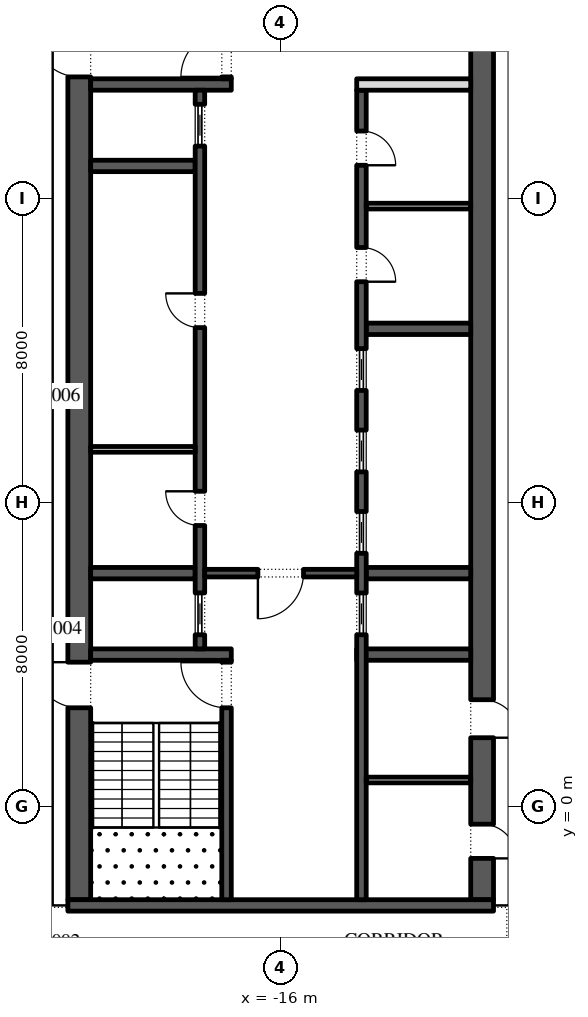
"""IFC4 building model, lengths in metres.
Left out: names, types, materials, properties, quantities, classifications, styles, units other than length and angle.
Written with IfcOpenShell. Run it as: python <this file> out.ifc"""

import sys

from ifc_helpers import new_model, si_unit, direction, frame, frame_2d, origin, place, context, subcontext, project, spatial, rectangle, extrude, element, fill, save


model = new_model("IFC4")
c1 = context("Model", 3, precision=1e-05, world=origin(), true_north=direction((0.0, 1.0)))
c2 = subcontext(c1, "Body", "Model", "MODEL_VIEW")
j1 = project(units=[si_unit("LENGTHUNIT", "METRE"), si_unit("PLANEANGLEUNIT", "RADIAN")], contexts=[c1])
p1 = place(None, origin())
s1 = spatial("IfcSite", under=j1, at=p1, CompositionType="ELEMENT")
p2 = place(p1, origin())
s2 = spatial("IfcBuilding", under=s1, at=p2, CompositionType="ELEMENT")
p3 = place(p2, frame((0.0, 0.0, 268.2)))
s3 = spatial("IfcBuildingStorey", under=s2, at=p3, CompositionType="ELEMENT", Elevation=268.2)
p4 = place(p3, frame((-21.359, 48.678, 0.0), z_axis=(0.0, 0.0, 1.0), x_axis=(-0.224949198343, -0.974370493275, 0.0)))
e1 = element("IfcWall", 1, at=p4, inside=s3, PredefinedType="STANDARD", context=c2, shape_type="SweptSolid", body=[
    extrude(rectangle(XDim=49.5, YDim=0.3, at=frame_2d((24.75, 0.0))), origin(), (0.0, 0.0, 1.0), 4.0),
])
p5 = place(p4, frame((1.157, 0.0, 0.45)))
e2 = element("IfcOpeningElement", 2, at=p5, cuts=e1, PredefinedType="OPENING", context=c2, shape_type="SweptSolid", body=[
    extrude(rectangle(XDim=4.5, YDim=3.05, at=frame_2d((2.25, 1.525))), frame((0.0, 0.16, 0.0), z_axis=(0.0, -1.0, 0.0), x_axis=(1.0, 0.0, 0.0)), (0.0, 0.0, 1.0), 0.32),
])
p6 = place(p4, frame((9.171, 0.0, 0.0)))
e3 = element("IfcOpeningElement", 3, at=p6, cuts=e1, PredefinedType="OPENING", context=c2, shape_type="SweptSolid", body=[
    extrude(rectangle(XDim=2.4, YDim=3.5, at=frame_2d((1.2, 1.75))), frame((0.0, 0.16, 0.0), z_axis=(0.0, -1.0, 0.0), x_axis=(1.0, 0.0, 0.0)), (0.0, 0.0, 1.0), 0.32),
])
p7 = place(p4, frame((15.236, 0.0, 0.45)))
e4 = element("IfcOpeningElement", 4, at=p7, cuts=e1, PredefinedType="OPENING", context=c2, shape_type="SweptSolid", body=[
    extrude(rectangle(XDim=4.5, YDim=3.05, at=frame_2d((2.25, 1.525))), frame((0.0, 0.16, 0.0), z_axis=(0.0, -1.0, 0.0), x_axis=(1.0, 0.0, 0.0)), (0.0, 0.0, 1.0), 0.32),
])
p8 = place(p4, frame((22.35, 0.0, 0.45)))
e5 = element("IfcOpeningElement", 5, at=p8, cuts=e1, PredefinedType="OPENING", context=c2, shape_type="SweptSolid", body=[
    extrude(rectangle(XDim=4.5, YDim=3.05, at=frame_2d((2.25, 1.525))), frame((0.0, 0.16, 0.0), z_axis=(0.0, -1.0, 0.0), x_axis=(1.0, 0.0, 0.0)), (0.0, 0.0, 1.0), 0.32),
])
p9 = place(p4, frame((29.464, 0.0, 0.45)))
e6 = element("IfcOpeningElement", 6, at=p9, cuts=e1, PredefinedType="OPENING", context=c2, shape_type="SweptSolid", body=[
    extrude(rectangle(XDim=4.5, YDim=3.05, at=frame_2d((2.25, 1.525))), frame((0.0, 0.16, 0.0), z_axis=(0.0, -1.0, 0.0), x_axis=(1.0, 0.0, 0.0)), (0.0, 0.0, 1.0), 0.32),
])
p10 = place(p4, frame((37.628, 0.0, 0.0)))
e7 = element("IfcOpeningElement", 7, at=p10, cuts=e1, PredefinedType="OPENING", context=c2, shape_type="SweptSolid", body=[
    extrude(rectangle(XDim=2.4, YDim=3.325, at=frame_2d((1.2, 1.663))), frame((0.0, 0.16, 0.0), z_axis=(0.0, -1.0, 0.0), x_axis=(1.0, 0.0, 0.0)), (0.0, 0.0, 1.0), 0.32),
])
p11 = place(p4, frame((43.693, 0.0, 0.45)))
e8 = element("IfcOpeningElement", 8, at=p11, cuts=e1, PredefinedType="OPENING", context=c2, shape_type="SweptSolid", body=[
    extrude(rectangle(XDim=4.5, YDim=2.825, at=frame_2d((2.25, 1.413))), frame((0.0, 0.16, 0.0), z_axis=(0.0, -1.0, 0.0), x_axis=(1.0, 0.0, 0.0)), (0.0, 0.0, 1.0), 0.32),
])
p12 = place(p3, frame((-21.3, -2.45, 0.0), z_axis=(0.0, 0.0, 1.0), x_axis=(0.0, 1.0, 0.0)))
e9 = element("IfcWall", 9, at=p12, inside=s3, PredefinedType="SHEAR", context=c2, shape_type="SweptSolid", body=[
    extrude(rectangle(XDim=27.9, YDim=0.6, at=frame_2d((13.95, 0.0))), origin(), (0.0, 0.0, 1.0), 4.0),
])
p13 = place(p12, frame((5.05, 0.0, 0.0)))
e10 = element("IfcOpeningElement", 10, at=p13, cuts=e9, PredefinedType="OPENING", context=c2, shape_type="SweptSolid", body=[
    extrude(rectangle(XDim=1.2, YDim=2.1, at=frame_2d((0.6, 1.05))), frame((0.0, 0.31, 0.0), z_axis=(0.0, -1.0, 0.0), x_axis=(1.0, 0.0, 0.0)), (0.0, 0.0, 1.0), 0.62),
])
p14 = place(p12, frame((21.65, 0.0, 0.0)))
e11 = element("IfcOpeningElement", 11, at=p14, cuts=e9, PredefinedType="OPENING", context=c2, shape_type="SweptSolid", body=[
    extrude(rectangle(XDim=1.2, YDim=2.1, at=frame_2d((0.6, 1.05))), frame((0.0, 0.31, 0.0), z_axis=(0.0, -1.0, 0.0), x_axis=(1.0, 0.0, 0.0)), (0.0, 0.0, 1.0), 0.62),
])
p15 = place(p3, frame((-10.7, -2.45, 0.0), z_axis=(0.0, 0.0, 1.0), x_axis=(0.0, 1.0, 0.0)))
e12 = element("IfcWall", 12, at=p15, inside=s3, PredefinedType="SHEAR", context=c2, shape_type="SweptSolid", body=[
    extrude(rectangle(XDim=27.9, YDim=0.6, at=frame_2d((13.95, 0.0))), origin(), (0.0, 0.0, 1.0), 4.0),
])
p16 = place(p15, frame((23.65, 0.0, 0.0)))
e13 = element("IfcOpeningElement", 13, at=p16, cuts=e12, PredefinedType="OPENING", context=c2, shape_type="SweptSolid", body=[
    extrude(rectangle(XDim=2.4, YDim=2.1, at=frame_2d((1.2, 1.05))), frame((0.0, 0.31, 0.0), z_axis=(0.0, -1.0, 0.0), x_axis=(1.0, 0.0, 0.0)), (0.0, 0.0, 1.0), 0.62),
])
p17 = place(p15, frame((1.087, 0.0, 0.0)))
e14 = element("IfcOpeningElement", 14, at=p17, cuts=e12, PredefinedType="OPENING", context=c2, shape_type="SweptSolid", body=[
    extrude(rectangle(XDim=0.9, YDim=2.1, at=frame_2d((0.45, 1.05))), frame((0.0, 0.31, 0.0), z_axis=(0.0, -1.0, 0.0), x_axis=(1.0, 0.0, 0.0)), (0.0, 0.0, 1.0), 0.62),
])
p18 = place(p15, frame((4.262, 0.0, 0.0)))
e15 = element("IfcOpeningElement", 15, at=p18, cuts=e12, PredefinedType="OPENING", context=c2, shape_type="SweptSolid", body=[
    extrude(rectangle(XDim=1.0, YDim=2.1, at=frame_2d((0.5, 1.05))), frame((0.0, 0.31, 0.0), z_axis=(0.0, -1.0, 0.0), x_axis=(1.0, 0.0, 0.0)), (0.0, 0.0, 1.0), 0.62),
])
p19 = place(p3, frame((-21.6, -2.6, 0.0), z_axis=(0.0, 0.0, 1.0), x_axis=(1.0, 0.0, 0.0)))
e16 = element("IfcWall", 16, at=p19, inside=s3, PredefinedType="SHEAR", context=c2, shape_type="SweptSolid", body=[
    extrude(rectangle(XDim=11.2, YDim=0.3, at=frame_2d((5.6, 0.0))), origin(), (0.0, 0.0, 1.0), 4.0),
])
p20 = place(p3, frame((-21.0, 4.0, 0.0), z_axis=(0.0, 0.0, 1.0), x_axis=(1.0, 0.0, 0.0)))
e17 = element("IfcWall", 17, at=p20, inside=s3, PredefinedType="SHEAR", context=c2, shape_type="SweptSolid", body=[
    extrude(rectangle(XDim=3.7, YDim=0.3, at=frame_2d((1.85, 0.0))), origin(), (0.0, 0.0, 1.0), 4.0),
])
p21 = place(p3, frame((-17.425, -2.45, 0.0), z_axis=(0.0, 0.0, 1.0), x_axis=(0.0, 1.0, 0.0)))
e18 = element("IfcWall", 18, at=p21, inside=s3, PredefinedType="SHEAR", context=c2, shape_type="SweptSolid", body=[
    extrude(rectangle(XDim=6.3, YDim=0.25, at=frame_2d((3.15, 0.0))), origin(), (0.0, 0.0, 1.0), 4.0),
])
p22 = place(p21, frame((5.05, 0.0, 0.0)))
e19 = element("IfcOpeningElement", 19, at=p22, cuts=e18, PredefinedType="OPENING", context=c2, shape_type="SweptSolid", body=[
    extrude(rectangle(XDim=1.2, YDim=2.1, at=frame_2d((0.6, 1.05))), frame((0.0, 0.135, 0.0), z_axis=(0.0, -1.0, 0.0), x_axis=(1.0, 0.0, 0.0)), (0.0, 0.0, 1.0), 0.27),
])
p23 = place(p3, frame((-21.0, 19.0, 0.0), z_axis=(0.0, 0.0, 1.0), x_axis=(1.0, 0.0, 0.0)))
e20 = element("IfcWall", 20, at=p23, inside=s3, PredefinedType="SHEAR", context=c2, shape_type="SweptSolid", body=[
    extrude(rectangle(XDim=3.7, YDim=0.3, at=frame_2d((1.85, 0.0))), origin(), (0.0, 0.0, 1.0), 4.0),
])
p24 = place(p3, frame((-17.425, 19.15, 0.0), z_axis=(0.0, 0.0, 1.0), x_axis=(0.0, 1.0, 0.0)))
e21 = element("IfcWall", 21, at=p24, inside=s3, PredefinedType="SHEAR", context=c2, shape_type="SweptSolid", body=[
    extrude(rectangle(XDim=6.3, YDim=0.25, at=frame_2d((3.15, 0.0))), origin(), (0.0, 0.0, 1.0), 4.0),
])
p25 = place(p24, frame((0.05, 0.0, 0.0)))
e22 = element("IfcOpeningElement", 22, at=p25, cuts=e21, PredefinedType="OPENING", context=c2, shape_type="SweptSolid", body=[
    extrude(rectangle(XDim=1.2, YDim=2.1, at=frame_2d((0.6, 1.05))), frame((0.0, 0.135, 0.0), z_axis=(0.0, -1.0, 0.0), x_axis=(1.0, 0.0, 0.0)), (0.0, 0.0, 1.0), 0.27),
])
for number, where, z_axis, x_axis in (
    (23, (-21.0, 6.143, 0.0), (0.0, 0.0, 1.0), (1.0, 0.0, 0.0)),
    (24, (-21.0, 16.857, 0.0), (0.0, 0.0, 1.0), (1.0, 0.0, 0.0)),
):
    element("IfcWall", number, at=place(p3, frame(where, z_axis=z_axis, x_axis=x_axis)), inside=s3, PredefinedType="SHEAR", context=c2, shape_type="SweptSolid", body=[
        extrude(rectangle(XDim=2.75, YDim=0.3, at=frame_2d((1.375, 0.0))), origin(), (0.0, 0.0, 1.0), 4.0),
    ])
p26 = place(p3, frame((-18.125, 4.15, 0.0), z_axis=(0.0, 0.0, 1.0), x_axis=(0.0, 1.0, 0.0)))
e25 = element("IfcWall", 25, at=p26, inside=s3, PredefinedType="SHEAR", context=c2, shape_type="SweptSolid", body=[
    extrude(rectangle(XDim=14.7, YDim=0.25, at=frame_2d((7.35, 0.0))), origin(), (0.0, 0.0, 1.0), 4.0),
])
p27 = place(p26, frame((3.246, 0.0, 0.0)))
e26 = element("IfcOpeningElement", 26, at=p27, cuts=e25, PredefinedType="OPENING", context=c2, shape_type="SweptSolid", body=[
    extrude(rectangle(XDim=0.9, YDim=2.1, at=frame_2d((0.45, 1.05))), frame((0.0, 0.135, 0.0), z_axis=(0.0, -1.0, 0.0), x_axis=(1.0, 0.0, 0.0)), (0.0, 0.0, 1.0), 0.27),
])
p28 = place(p26, frame((8.454, 0.0, 0.0)))
e27 = element("IfcOpeningElement", 27, at=p28, cuts=e25, PredefinedType="OPENING", context=c2, shape_type="SweptSolid", body=[
    extrude(rectangle(XDim=0.9, YDim=2.1, at=frame_2d((0.45, 1.05))), frame((0.0, 0.135, 0.0), z_axis=(0.0, -1.0, 0.0), x_axis=(1.0, 0.0, 0.0)), (0.0, 0.0, 1.0), 0.27),
])
p29 = place(p26, frame((0.371, 0.0, 0.0)))
e28 = element("IfcOpeningElement", 28, at=p29, cuts=e25, PredefinedType="OPENING", context=c2, shape_type="SweptSolid", body=[
    extrude(rectangle(XDim=1.1, YDim=2.1, at=frame_2d((0.55, 1.05))), frame((0.0, 0.135, 0.0), z_axis=(0.0, -1.0, 0.0), x_axis=(1.0, 0.0, 0.0)), (0.0, 0.0, 1.0), 0.27),
])
p30 = place(p26, frame((13.229, 0.0, 0.0)))
e29 = element("IfcOpeningElement", 29, at=p30, cuts=e25, PredefinedType="OPENING", context=c2, shape_type="SweptSolid", body=[
    extrude(rectangle(XDim=1.1, YDim=2.1, at=frame_2d((0.55, 1.05))), frame((0.0, 0.135, 0.0), z_axis=(0.0, -1.0, 0.0), x_axis=(1.0, 0.0, 0.0)), (0.0, 0.0, 1.0), 0.27),
])
p31 = place(p3, frame((-21.0, 9.4, 0.0), z_axis=(0.0, 0.0, 1.0), x_axis=(1.0, 0.0, 0.0)))
e30 = element("IfcWall", 30, at=p31, inside=s3, PredefinedType="PARTITIONING", context=c2, shape_type="SweptSolid", body=[
    extrude(rectangle(XDim=2.75, YDim=0.15, at=frame_2d((1.375, 0.0))), origin(), (0.0, 0.0, 1.0), 4.0),
])
p32 = place(p3, frame((-14.0, 4.0, 0.0), z_axis=(0.0, 0.0, 1.0), x_axis=(1.0, 0.0, 0.0)))
e31 = element("IfcWall", 31, at=p32, inside=s3, PredefinedType="SHEAR", context=c2, shape_type="SweptSolid", body=[
    extrude(rectangle(XDim=3.0, YDim=0.3, at=frame_2d((1.5, 0.0))), origin(), (0.0, 0.0, 1.0), 4.0),
])
for number, where, z_axis, x_axis in (
    (32, (-13.75, 6.143, 0.0), (0.0, 0.0, 1.0), (1.0, 0.0, 0.0)),
    (33, (-13.75, 12.571, 0.0), (0.0, 0.0, 1.0), (1.0, 0.0, 0.0)),
):
    element("IfcWall", number, at=place(p3, frame(where, z_axis=z_axis, x_axis=x_axis)), inside=s3, PredefinedType="SHEAR", context=c2, shape_type="SweptSolid", body=[
        extrude(rectangle(XDim=2.75, YDim=0.3, at=frame_2d((1.375, 0.0))), origin(), (0.0, 0.0, 1.0), 4.0),
    ])
p33 = place(p3, frame((-13.875, -2.45, 0.0), z_axis=(0.0, 0.0, 1.0), x_axis=(0.0, 1.0, 0.0)))
e34 = element("IfcWall", 34, at=p33, inside=s3, PredefinedType="SHEAR", context=c2, shape_type="SweptSolid", body=[
    extrude(rectangle(XDim=21.3, YDim=0.25, at=frame_2d((10.65, 0.0))), origin(), (0.0, 0.0, 1.0), 4.0),
])
p34 = place(p33, frame((16.261, 0.0, 0.0)))
e35 = element("IfcOpeningElement", 35, at=p34, cuts=e34, PredefinedType="OPENING", context=c2, shape_type="SweptSolid", body=[
    extrude(rectangle(XDim=0.9, YDim=2.1, at=frame_2d((0.45, 1.05))), frame((0.0, 0.135, 0.0), z_axis=(0.0, -1.0, 0.0), x_axis=(1.0, 0.0, 0.0)), (0.0, 0.0, 1.0), 0.27),
])
p35 = place(p33, frame((19.325, 0.0, 0.0)))
e36 = element("IfcOpeningElement", 36, at=p35, cuts=e34, PredefinedType="OPENING", context=c2, shape_type="SweptSolid", body=[
    extrude(rectangle(XDim=0.9, YDim=2.1, at=frame_2d((0.45, 1.05))), frame((0.0, 0.135, 0.0), z_axis=(0.0, -1.0, 0.0), x_axis=(1.0, 0.0, 0.0)), (0.0, 0.0, 1.0), 0.27),
])
p36 = place(p33, frame((6.971, 0.0, 0.0)))
e37 = element("IfcOpeningElement", 37, at=p36, cuts=e34, PredefinedType="OPENING", context=c2, shape_type="SweptSolid", body=[
    extrude(rectangle(XDim=1.1, YDim=2.1, at=frame_2d((0.55, 1.05))), frame((0.0, 0.135, 0.0), z_axis=(0.0, -1.0, 0.0), x_axis=(1.0, 0.0, 0.0)), (0.0, 0.0, 1.0), 0.27),
])
p37 = place(p33, frame((9.114, 0.0, 0.0)))
e38 = element("IfcOpeningElement", 38, at=p37, cuts=e34, PredefinedType="OPENING", context=c2, shape_type="SweptSolid", body=[
    extrude(rectangle(XDim=1.1, YDim=2.1, at=frame_2d((0.55, 1.05))), frame((0.0, 0.135, 0.0), z_axis=(0.0, -1.0, 0.0), x_axis=(1.0, 0.0, 0.0)), (0.0, 0.0, 1.0), 0.27),
])
p38 = place(p33, frame((11.257, 0.0, 0.0)))
e39 = element("IfcOpeningElement", 39, at=p38, cuts=e34, PredefinedType="OPENING", context=c2, shape_type="SweptSolid", body=[
    extrude(rectangle(XDim=1.1, YDim=2.1, at=frame_2d((0.55, 1.05))), frame((0.0, 0.135, 0.0), z_axis=(0.0, -1.0, 0.0), x_axis=(1.0, 0.0, 0.0)), (0.0, 0.0, 1.0), 0.27),
])
p39 = place(p33, frame((13.4, 0.0, 0.0)))
e40 = element("IfcOpeningElement", 40, at=p39, cuts=e34, PredefinedType="OPENING", context=c2, shape_type="SweptSolid", body=[
    extrude(rectangle(XDim=1.1, YDim=2.1, at=frame_2d((0.55, 1.05))), frame((0.0, 0.135, 0.0), z_axis=(0.0, -1.0, 0.0), x_axis=(1.0, 0.0, 0.0)), (0.0, 0.0, 1.0), 0.27),
])
p40 = place(p3, frame((-14.0, 19.0, 0.0), z_axis=(0.0, 0.0, 1.0), x_axis=(1.0, 0.0, 0.0)))
e41 = element("IfcWall", 41, at=p40, inside=s3, PredefinedType="PARTITIONING", context=c2, shape_type="SweptSolid", body=[
    extrude(rectangle(XDim=3.0, YDim=0.3, at=frame_2d((1.5, 0.0))), origin(), (0.0, 0.0, 1.0), 4.0),
])
p41 = place(p3, frame((-13.75, 15.8, 0.0), z_axis=(0.0, 0.0, 1.0), x_axis=(1.0, 0.0, 0.0)))
e42 = element("IfcWall", 42, at=p41, inside=s3, PredefinedType="PARTITIONING", context=c2, shape_type="SweptSolid", body=[
    extrude(rectangle(XDim=2.75, YDim=0.15, at=frame_2d((1.375, 0.0))), origin(), (0.0, 0.0, 1.0), 4.0),
])
p42 = place(p3, frame((-18.0, 6.143, 0.0), z_axis=(0.0, 0.0, 1.0), x_axis=(1.0, 0.0, 0.0)))
e43 = element("IfcWall", 43, at=p42, inside=s3, PredefinedType="SHEAR", context=c2, shape_type="SweptSolid", body=[
    extrude(rectangle(XDim=4.0, YDim=0.2, at=frame_2d((2.0, 0.0))), origin(), (0.0, 0.0, 1.0), 4.0),
])
p43 = place(p42, frame((1.4, 0.0, 0.0)))
e44 = element("IfcOpeningElement", 44, at=p43, cuts=e43, PredefinedType="OPENING", context=c2, shape_type="SweptSolid", body=[
    extrude(rectangle(XDim=1.2, YDim=2.1, at=frame_2d((0.6, 1.05))), frame((0.0, 0.11, 0.0), z_axis=(0.0, -1.0, 0.0), x_axis=(1.0, 0.0, 0.0)), (0.0, 0.0, 1.0), 0.22),
])
p44 = place(p3, frame((-13.75, 0.7, 0.0), z_axis=(0.0, 0.0, 1.0), x_axis=(1.0, 0.0, 0.0)))
e45 = element("IfcWall", 45, at=p44, inside=s3, PredefinedType="PARTITIONING", context=c2, shape_type="SweptSolid", body=[
    extrude(rectangle(XDim=2.75, YDim=0.15, at=frame_2d((1.375, 0.0))), origin(), (0.0, 0.0, 1.0), 4.0),
])
p45 = place(p27, origin())
e46 = element("IfcDoor", 46, at=p45, inside=s3, OperationType="SINGLE_SWING_LEFT", PredefinedType="DOOR", context=c2, shape_type="SweptSolid", body=[
    extrude(rectangle(XDim=0.9, YDim=2.1, at=frame_2d((0.45, 1.05))), frame((0.0, 0.125, 0.0), z_axis=(0.0, -1.0, 0.0), x_axis=(1.0, 0.0, 0.0)), (0.0, 0.0, 1.0), 0.05),
])
fill(e26, e46)
p46 = place(p28, origin())
e47 = element("IfcDoor", 47, at=p46, inside=s3, OperationType="SINGLE_SWING_LEFT", PredefinedType="DOOR", context=c2, shape_type="SweptSolid", body=[
    extrude(rectangle(XDim=0.9, YDim=2.1, at=frame_2d((0.45, 1.05))), frame((0.0, 0.125, 0.0), z_axis=(0.0, -1.0, 0.0), x_axis=(1.0, 0.0, 0.0)), (0.0, 0.0, 1.0), 0.05),
])
fill(e27, e47)
p47 = place(p29, origin())
e48 = element("IfcDoor", 48, at=p47, inside=s3, OperationType="SLIDING_TO_LEFT", PredefinedType="DOOR", context=c2, shape_type="SweptSolid", body=[
    extrude(rectangle(XDim=1.1, YDim=2.1, at=frame_2d((0.55, 1.05))), frame((0.0, 0.025, 0.0), z_axis=(0.0, -1.0, 0.0), x_axis=(1.0, 0.0, 0.0)), (0.0, 0.0, 1.0), 0.05),
])
fill(e28, e48)
p48 = place(p30, origin())
e49 = element("IfcDoor", 49, at=p48, inside=s3, OperationType="SLIDING_TO_LEFT", PredefinedType="DOOR", context=c2, shape_type="SweptSolid", body=[
    extrude(rectangle(XDim=1.1, YDim=2.1, at=frame_2d((0.55, 1.05))), frame((0.0, 0.025, 0.0), z_axis=(0.0, -1.0, 0.0), x_axis=(1.0, 0.0, 0.0)), (0.0, 0.0, 1.0), 0.05),
])
fill(e29, e49)
p49 = place(p34, frame((0.9, -0.2, 0.0), z_axis=(0.0, 0.0, 1.0), x_axis=(-1.0, 0.0, 0.0)))
e50 = element("IfcDoor", 50, at=p49, inside=s3, OperationType="SINGLE_SWING_LEFT", PredefinedType="DOOR", context=c2, shape_type="SweptSolid", body=[
    extrude(rectangle(XDim=0.9, YDim=2.1, at=frame_2d((0.45, 1.05))), frame((0.0, -0.075, 0.0), z_axis=(0.0, -1.0, 0.0), x_axis=(1.0, 0.0, 0.0)), (0.0, 0.0, 1.0), 0.05),
])
fill(e35, e50)
p50 = place(p35, frame((0.9, -0.2, 0.0), z_axis=(0.0, 0.0, 1.0), x_axis=(-1.0, 0.0, 0.0)))
e51 = element("IfcDoor", 51, at=p50, inside=s3, OperationType="SINGLE_SWING_LEFT", PredefinedType="DOOR", context=c2, shape_type="SweptSolid", body=[
    extrude(rectangle(XDim=0.9, YDim=2.1, at=frame_2d((0.45, 1.05))), frame((0.0, -0.075, 0.0), z_axis=(0.0, -1.0, 0.0), x_axis=(1.0, 0.0, 0.0)), (0.0, 0.0, 1.0), 0.05),
])
fill(e36, e51)
p51 = place(p36, origin())
e52 = element("IfcDoor", 52, at=p51, inside=s3, OperationType="SLIDING_TO_LEFT", PredefinedType="DOOR", context=c2, shape_type="SweptSolid", body=[
    extrude(rectangle(XDim=1.1, YDim=2.1, at=frame_2d((0.55, 1.05))), frame((0.0, 0.025, 0.0), z_axis=(0.0, -1.0, 0.0), x_axis=(1.0, 0.0, 0.0)), (0.0, 0.0, 1.0), 0.05),
])
fill(e37, e52)
p52 = place(p37, origin())
e53 = element("IfcDoor", 53, at=p52, inside=s3, OperationType="SLIDING_TO_LEFT", PredefinedType="DOOR", context=c2, shape_type="SweptSolid", body=[
    extrude(rectangle(XDim=1.1, YDim=2.1, at=frame_2d((0.55, 1.05))), frame((0.0, 0.025, 0.0), z_axis=(0.0, -1.0, 0.0), x_axis=(1.0, 0.0, 0.0)), (0.0, 0.0, 1.0), 0.05),
])
fill(e38, e53)
p53 = place(p38, origin())
e54 = element("IfcDoor", 54, at=p53, inside=s3, OperationType="SLIDING_TO_LEFT", PredefinedType="DOOR", context=c2, shape_type="SweptSolid", body=[
    extrude(rectangle(XDim=1.1, YDim=2.1, at=frame_2d((0.55, 1.05))), frame((0.0, 0.025, 0.0), z_axis=(0.0, -1.0, 0.0), x_axis=(1.0, 0.0, 0.0)), (0.0, 0.0, 1.0), 0.05),
])
fill(e39, e54)
p54 = place(p39, origin())
e55 = element("IfcDoor", 55, at=p54, inside=s3, OperationType="SLIDING_TO_LEFT", PredefinedType="DOOR", context=c2, shape_type="SweptSolid", body=[
    extrude(rectangle(XDim=1.1, YDim=2.1, at=frame_2d((0.55, 1.05))), frame((0.0, 0.025, 0.0), z_axis=(0.0, -1.0, 0.0), x_axis=(1.0, 0.0, 0.0)), (0.0, 0.0, 1.0), 0.05),
])
fill(e40, e55)
p55 = place(p43, frame((1.2, 0.0, 0.0), z_axis=(0.0, 0.0, 1.0), x_axis=(-1.0, 0.0, 0.0)))
e56 = element("IfcDoor", 56, at=p55, inside=s3, OperationType="SINGLE_SWING_LEFT", PredefinedType="DOOR", context=c2, shape_type="SweptSolid", body=[
    extrude(rectangle(XDim=1.2, YDim=2.1, at=frame_2d((0.6, 1.05))), frame((0.0, 0.025, 0.0), z_axis=(0.0, -1.0, 0.0), x_axis=(1.0, 0.0, 0.0)), (0.0, 0.0, 1.0), 0.05),
])
fill(e44, e56)
p56 = place(p22, origin())
e57 = element("IfcDoor", 57, at=p56, inside=s3, OperationType="SINGLE_SWING_LEFT", PredefinedType="DOOR", context=c2, shape_type="SweptSolid", body=[
    extrude(rectangle(XDim=1.2, YDim=2.1, at=frame_2d((0.6, 1.05))), frame((0.0, 0.025, 0.0), z_axis=(0.0, -1.0, 0.0), x_axis=(1.0, 0.0, 0.0)), (0.0, 0.0, 1.0), 0.05),
])
fill(e19, e57)
p57 = place(p13, origin())
e58 = element("IfcDoor", 58, at=p57, inside=s3, OperationType="SINGLE_SWING_LEFT", PredefinedType="DOOR", context=c2, shape_type="SweptSolid", body=[
    extrude(rectangle(XDim=1.2, YDim=2.1, at=frame_2d((0.6, 1.05))), frame((0.0, 0.025, 0.0), z_axis=(0.0, -1.0, 0.0), x_axis=(1.0, 0.0, 0.0)), (0.0, 0.0, 1.0), 0.05),
])
fill(e10, e58)
p58 = place(p25, origin())
e59 = element("IfcDoor", 59, at=p58, inside=s3, OperationType="SINGLE_SWING_RIGHT", PredefinedType="DOOR", context=c2, shape_type="SweptSolid", body=[
    extrude(rectangle(XDim=1.2, YDim=2.1, at=frame_2d((0.6, 1.05))), frame((0.0, 0.025, 0.0), z_axis=(0.0, -1.0, 0.0), x_axis=(1.0, 0.0, 0.0)), (0.0, 0.0, 1.0), 0.05),
])
fill(e22, e59)
p59 = place(p14, origin())
e60 = element("IfcDoor", 60, at=p59, inside=s3, OperationType="SINGLE_SWING_LEFT", PredefinedType="DOOR", context=c2, shape_type="SweptSolid", body=[
    extrude(rectangle(XDim=1.2, YDim=2.1, at=frame_2d((0.6, 1.05))), frame((0.0, 0.025, 0.0), z_axis=(0.0, -1.0, 0.0), x_axis=(1.0, 0.0, 0.0)), (0.0, 0.0, 1.0), 0.05),
])
fill(e11, e60)
p60 = place(p17, frame((0.9, 0.55, 0.0), z_axis=(0.0, 0.0, 1.0), x_axis=(-1.0, 0.0, 0.0)))
e61 = element("IfcDoor", 61, at=p60, inside=s3, OperationType="SINGLE_SWING_LEFT", PredefinedType="DOOR", context=c2, shape_type="SweptSolid", body=[
    extrude(rectangle(XDim=0.9, YDim=2.1, at=frame_2d((0.45, 1.05))), frame((0.0, 0.3, 0.0), z_axis=(0.0, -1.0, 0.0), x_axis=(1.0, 0.0, 0.0)), (0.0, 0.0, 1.0), 0.05),
])
fill(e14, e61)
p61 = place(p18, frame((1.0, 0.55, 0.0), z_axis=(0.0, 0.0, 1.0), x_axis=(-1.0, 0.0, 0.0)))
e62 = element("IfcDoor", 62, at=p61, inside=s3, OperationType="SINGLE_SWING_LEFT", PredefinedType="DOOR", context=c2, shape_type="SweptSolid", body=[
    extrude(rectangle(XDim=1.0, YDim=2.1, at=frame_2d((0.5, 1.05))), frame((0.0, 0.3, 0.0), z_axis=(0.0, -1.0, 0.0), x_axis=(1.0, 0.0, 0.0)), (0.0, 0.0, 1.0), 0.05),
])
fill(e15, e62)
save(model, sys.argv[1])
